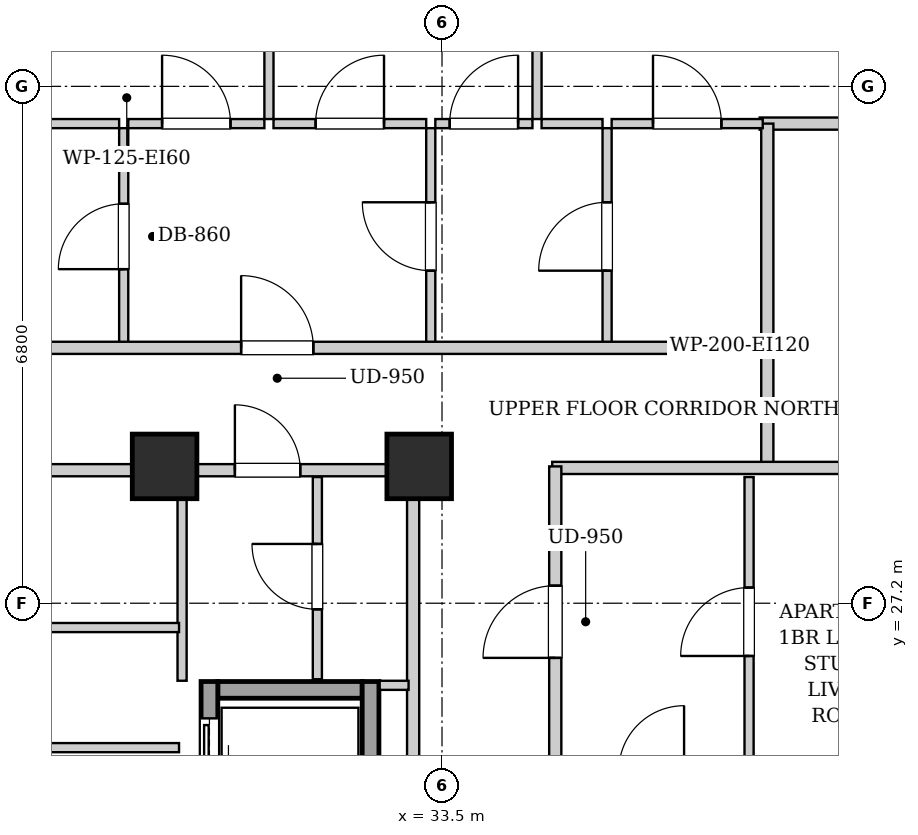
"""IFC4 building model, lengths in metres.
Left out: names, types, materials, properties, quantities, classifications, styles, units other than length and angle.
Written with IfcOpenShell. Run it as: python <this file> out.ifc"""

import sys

from ifc_helpers import new_model, si_unit, direction, frame, frame_2d, origin, origin_2d, place, context, subcontext, project, spatial, rectangle, extrude, element, fill, save


model = new_model("IFC4")
c1 = context("Model", 3, precision=1e-05, world=origin(), true_north=direction((0.0, 1.0)))
c2 = subcontext(c1, "Body", "Model", "MODEL_VIEW")
j1 = project(units=[si_unit("LENGTHUNIT", "METRE"), si_unit("PLANEANGLEUNIT", "RADIAN")], contexts=[c1])
p1 = place(None, origin())
s1 = spatial("IfcSite", under=j1, at=p1, CompositionType="ELEMENT")
p2 = place(p1, origin())
s2 = spatial("IfcBuilding", under=s1, at=p2, CompositionType="ELEMENT")
p3 = place(p2, frame((0.0, 0.0, 190.9)))
s3 = spatial("IfcBuildingStorey", under=s2, at=p3, CompositionType="ELEMENT", Elevation=190.9)
for number, where, z_axis, x_axis in (
    (1, (29.85, 29.0, 0.0), (0.0, 0.0, 1.0), (1.0, 0.0, 0.0)),
    (2, (33.2, 29.0, 0.0), (0.0, 0.0, 1.0), (1.0, 0.0, 0.0)),
):
    element("IfcColumn", number, at=place(p3, frame(where, z_axis=z_axis, x_axis=x_axis)), inside=s3, PredefinedType="COLUMN", context=c2, shape_type="SweptSolid", body=[
        extrude(rectangle(XDim=0.85, YDim=0.85, at=origin_2d()), origin(), (0.0, 0.0, 1.0), 3.3),
    ])
p4 = place(p3, frame((30.55, 26.06, 0.0), z_axis=(0.0, 0.0, 1.0), x_axis=(1.0, 0.0, 0.0)))
e3 = element("IfcWall", 3, at=p4, inside=s3, PredefinedType="SHEAR", context=c2, shape_type="SweptSolid", body=[
    extrude(rectangle(XDim=1.9, YDim=0.22, at=frame_2d((0.95, 0.0))), origin(), (0.0, 0.0, 1.0), 3.04),
])
p5 = place(p3, frame((30.44, 24.1, 0.0), z_axis=(0.0, 0.0, 1.0), x_axis=(0.0, 1.0, 0.0)))
e4 = element("IfcWall", 4, at=p5, inside=s3, PredefinedType="SHEAR", context=c2, shape_type="SweptSolid", body=[
    extrude(rectangle(XDim=2.07, YDim=0.22, at=frame_2d((1.035, 0.0))), origin(), (0.0, 0.0, 1.0), 3.04),
])
p6 = place(p5, frame((0.485, 0.0, 0.0)))
e5 = element("IfcOpeningElement", 5, at=p6, cuts=e4, PredefinedType="OPENING", context=c2, shape_type="SweptSolid", body=[
    extrude(rectangle(XDim=1.1, YDim=2.15, at=frame_2d((0.55, 1.075))), frame((0.0, 0.12, 0.0), z_axis=(0.0, -1.0, 0.0), x_axis=(1.0, 0.0, 0.0)), (0.0, 0.0, 1.0), 0.24),
])
p7 = place(p3, frame((32.56, 24.1, 0.0), z_axis=(0.0, 0.0, 1.0), x_axis=(0.0, 1.0, 0.0)))
e6 = element("IfcWall", 6, at=p7, inside=s3, PredefinedType="SHEAR", context=c2, shape_type="SweptSolid", body=[
    extrude(rectangle(XDim=2.07, YDim=0.22, at=frame_2d((1.035, 0.0))), origin(), (0.0, 0.0, 1.0), 3.04),
])
p8 = place(p3, frame((33.12, 24.12, 0.0), z_axis=(0.0, 0.0, 1.0), x_axis=(0.0, 1.0, 0.0)))
e7 = element("IfcWall", 7, at=p8, inside=s3, PredefinedType="PARTITIONING", context=c2, shape_type="SweptSolid", body=[
    extrude(rectangle(XDim=4.76, YDim=0.16, at=frame_2d((2.38, 0.0))), origin(), (0.0, 0.0, 1.0), 3.04),
])
p9 = place(p3, frame((30.08, 26.18, 0.0), z_axis=(0.0, 0.0, 1.0), x_axis=(0.0, 1.0, 0.0)))
e8 = element("IfcWall", 8, at=p9, inside=s3, PredefinedType="PARTITIONING", context=c2, shape_type="SweptSolid", body=[
    extrude(rectangle(XDim=2.68, YDim=0.12, at=frame_2d((1.34, 0.0))), origin(), (0.0, 0.0, 1.0), 3.04),
])
p10 = place(p3, frame((32.68, 26.12, 0.0), z_axis=(0.0, 0.0, 1.0), x_axis=(1.0, 0.0, 0.0)))
e9 = element("IfcWall", 9, at=p10, inside=s3, PredefinedType="PARTITIONING", context=c2, shape_type="SweptSolid", body=[
    extrude(rectangle(XDim=0.38, YDim=0.12, at=frame_2d((0.19, 0.0))), origin(), (0.0, 0.0, 1.0), 3.04),
])
p11 = place(p3, frame((31.86, 26.2, 0.0), z_axis=(0.0, 0.0, 1.0), x_axis=(0.0, 1.0, 0.0)))
e10 = element("IfcWall", 10, at=p11, inside=s3, PredefinedType="PARTITIONING", context=c2, shape_type="SweptSolid", body=[
    extrude(rectangle(XDim=2.66, YDim=0.12, at=frame_2d((1.33, 0.0))), origin(), (0.0, 0.0, 1.0), 3.04),
])
p12 = place(p11, frame((0.92, 0.0, 0.0)))
e11 = element("IfcOpeningElement", 11, at=p12, cuts=e10, PredefinedType="OPENING", context=c2, shape_type="SweptSolid", body=[
    extrude(rectangle(XDim=0.86, YDim=2.05, at=frame_2d((0.43, 1.025))), frame((0.0, 0.07, 0.0), z_axis=(0.0, -1.0, 0.0), x_axis=(1.0, 0.0, 0.0)), (0.0, 0.0, 1.0), 0.14),
])
p13 = place(p3, frame((30.08, 28.95, 0.0), z_axis=(0.0, 0.0, 1.0), x_axis=(1.0, 0.0, 0.0)))
e12 = element("IfcWall", 12, at=p13, inside=s3, PredefinedType="PARTITIONING", context=c2, shape_type="SweptSolid", body=[
    extrude(rectangle(XDim=2.96, YDim=0.16, at=frame_2d((1.48, 0.0))), origin(), (0.0, 0.0, 1.0), 3.04),
])
p14 = place(p13, frame((0.695, 0.0, 0.0)))
e13 = element("IfcOpeningElement", 13, at=p14, cuts=e12, PredefinedType="OPENING", context=c2, shape_type="SweptSolid", body=[
    extrude(rectangle(XDim=0.86, YDim=2.05, at=frame_2d((0.43, 1.025))), frame((0.0, 0.09, 0.0), z_axis=(0.0, -1.0, 0.0), x_axis=(1.0, 0.0, 0.0)), (0.0, 0.0, 1.0), 0.18),
])
p15 = place(p3, frame((25.72, 26.88, 0.0), z_axis=(0.0, 0.0, 1.0), x_axis=(1.0, 0.0, 0.0)))
e14 = element("IfcWall", 14, at=p15, inside=s3, PredefinedType="PARTITIONING", context=c2, shape_type="SweptSolid", body=[
    extrude(rectangle(XDim=4.32, YDim=0.12, at=frame_2d((2.16, 0.0))), origin(), (0.0, 0.0, 1.0), 3.04),
])
p16 = place(p3, frame((25.72, 25.3, 0.0), z_axis=(0.0, 0.0, 1.0), x_axis=(1.0, 0.0, 0.0)))
e15 = element("IfcWall", 15, at=p16, inside=s3, PredefinedType="PARTITIONING", context=c2, shape_type="SweptSolid", body=[
    extrude(rectangle(XDim=4.32, YDim=0.12, at=frame_2d((2.16, 0.0))), origin(), (0.0, 0.0, 1.0), 3.04),
])
p17 = place(p16, frame((1.65, 0.0, 0.0)))
e16 = element("IfcOpeningElement", 16, at=p17, cuts=e15, PredefinedType="OPENING", context=c2, shape_type="SweptSolid", body=[
    extrude(rectangle(XDim=0.9, YDim=2.05, at=frame_2d((0.45, 1.025))), frame((0.0, 0.07, 0.0), z_axis=(0.0, -1.0, 0.0), x_axis=(1.0, 0.0, 0.0)), (0.0, 0.0, 1.0), 0.14),
])
p18 = place(p3, frame((25.72, 28.95, 0.0), z_axis=(0.0, 0.0, 1.0), x_axis=(1.0, 0.0, 0.0)))
e17 = element("IfcWall", 17, at=p18, inside=s3, PredefinedType="PARTITIONING", context=c2, shape_type="SweptSolid", body=[
    extrude(rectangle(XDim=4.32, YDim=0.16, at=frame_2d((2.16, 0.0))), origin(), (0.0, 0.0, 1.0), 2.556),
])
p19 = place(p18, frame((1.27, 0.0, 0.0)))
e18 = element("IfcOpeningElement", 18, at=p19, cuts=e17, PredefinedType="OPENING", context=c2, shape_type="SweptSolid", body=[
    extrude(rectangle(XDim=0.86, YDim=2.05, at=frame_2d((0.43, 1.025))), frame((0.0, 0.09, 0.0), z_axis=(0.0, -1.0, 0.0), x_axis=(1.0, 0.0, 0.0)), (0.0, 0.0, 1.0), 0.18),
])
p20 = place(p3, frame((37.78, 28.98, 0.0), z_axis=(0.0, 0.0, 1.0), x_axis=(0.0, 1.0, 0.0)))
e19 = element("IfcWall", 19, at=p20, inside=s3, PredefinedType="PARTITIONING", context=c2, shape_type="SweptSolid", body=[
    extrude(rectangle(XDim=1.58, YDim=0.16, at=frame_2d((0.79, 0.0))), origin(), (0.0, 0.0, 1.0), 3.04),
])
p21 = place(p3, frame((34.95, 28.98, 0.0), z_axis=(0.0, 0.0, 1.0), x_axis=(1.0, 0.0, 0.0)))
e20 = element("IfcWall", 20, at=p21, inside=s3, PredefinedType="PARTITIONING", context=c2, shape_type="SweptSolid", body=[
    extrude(rectangle(XDim=5.07, YDim=0.16, at=frame_2d((2.535, 0.0))), origin(), (0.0, 0.0, 1.0), 2.556),
])
p22 = place(p3, frame((37.68, 33.51, 0.0), z_axis=(0.0, 0.0, 1.0), x_axis=(1.0, 0.0, 0.0)))
e21 = element("IfcWall", 21, at=p22, inside=s3, PredefinedType="PARTITIONING", context=c2, shape_type="SweptSolid", body=[
    extrude(rectangle(XDim=2.34, YDim=0.16, at=frame_2d((1.17, 0.0))), origin(), (0.0, 0.0, 1.0), 3.04),
])
p23 = place(p3, frame((37.78, 30.6, 0.0), z_axis=(0.0, 0.0, 1.0), x_axis=(0.0, 1.0, 0.0)))
e22 = element("IfcWall", 22, at=p23, inside=s3, PredefinedType="PARTITIONING", context=c2, shape_type="SweptSolid", body=[
    extrude(rectangle(XDim=2.91, YDim=0.16, at=frame_2d((1.455, 0.0))), origin(), (0.0, 0.0, 1.0), 3.04),
])
p24 = place(p3, frame((29.312, 30.6, 0.0), z_axis=(0.0, 0.0, 1.0), x_axis=(0.0, 1.0, 0.0)))
e23 = element("IfcWall", 23, at=p24, inside=s3, PredefinedType="PARTITIONING", context=c2, shape_type="SweptSolid", body=[
    extrude(rectangle(XDim=2.85, YDim=0.12, at=frame_2d((1.425, 0.0))), origin(), (0.0, 0.0, 1.0), 3.04),
])
p25 = place(p24, frame((0.995, 0.0, 0.0)))
e24 = element("IfcOpeningElement", 24, at=p25, cuts=e23, PredefinedType="OPENING", context=c2, shape_type="SweptSolid", body=[
    extrude(rectangle(XDim=0.86, YDim=2.05, at=frame_2d((0.43, 1.025))), frame((0.0, 0.07, 0.0), z_axis=(0.0, -1.0, 0.0), x_axis=(1.0, 0.0, 0.0)), (0.0, 0.0, 1.0), 0.14),
])
p26 = place(p3, frame((26.852, 33.51, 0.0), z_axis=(0.0, 0.0, 1.0), x_axis=(1.0, 0.0, 0.0)))
e25 = element("IfcWall", 25, at=p26, inside=s3, PredefinedType="PARTITIONING", context=c2, shape_type="SweptSolid", body=[
    extrude(rectangle(XDim=2.4, YDim=0.12, at=frame_2d((1.2, 0.0))), origin(), (0.0, 0.0, 1.0), 3.04),
])
p27 = place(p3, frame((33.352, 30.6, 0.0), z_axis=(0.0, 0.0, 1.0), x_axis=(0.0, 1.0, 0.0)))
e26 = element("IfcWall", 26, at=p27, inside=s3, PredefinedType="PARTITIONING", context=c2, shape_type="SweptSolid", body=[
    extrude(rectangle(XDim=2.85, YDim=0.12, at=frame_2d((1.425, 0.0))), origin(), (0.0, 0.0, 1.0), 3.04),
])
p28 = place(p27, frame((0.975, 0.0, 0.0)))
e27 = element("IfcOpeningElement", 27, at=p28, cuts=e26, PredefinedType="OPENING", context=c2, shape_type="SweptSolid", body=[
    extrude(rectangle(XDim=0.9, YDim=2.05, at=frame_2d((0.45, 1.025))), frame((0.0, 0.07, 0.0), z_axis=(0.0, -1.0, 0.0), x_axis=(1.0, 0.0, 0.0)), (0.0, 0.0, 1.0), 0.14),
])
p29 = place(p3, frame((29.372, 33.51, 0.0), z_axis=(0.0, 0.0, 1.0), x_axis=(1.0, 0.0, 0.0)))
e28 = element("IfcWall", 28, at=p29, inside=s3, PredefinedType="PARTITIONING", context=c2, shape_type="SweptSolid", body=[
    extrude(rectangle(XDim=1.791, YDim=0.12, at=frame_2d((0.896, 0.0))), origin(), (0.0, 0.0, 1.0), 3.04),
])
p30 = place(p29, frame((0.445, 0.0, 0.0)))
e29 = element("IfcOpeningElement", 29, at=p30, cuts=e28, PredefinedType="OPENING", context=c2, shape_type="SweptSolid", body=[
    extrude(rectangle(XDim=0.9, YDim=2.05, at=frame_2d((0.45, 1.025))), frame((0.0, 0.07, 0.0), z_axis=(0.0, -1.0, 0.0), x_axis=(1.0, 0.0, 0.0)), (0.0, 0.0, 1.0), 0.14),
])
p31 = place(p3, frame((31.283, 33.51, 0.0), z_axis=(0.0, 0.0, 1.0), x_axis=(1.0, 0.0, 0.0)))
e30 = element("IfcWall", 30, at=p31, inside=s3, PredefinedType="PARTITIONING", context=c2, shape_type="SweptSolid", body=[
    extrude(rectangle(XDim=2.009, YDim=0.12, at=frame_2d((1.004, 0.0))), origin(), (0.0, 0.0, 1.0), 3.04),
])
p32 = place(p31, frame((0.554, 0.0, 0.0)))
e31 = element("IfcOpeningElement", 31, at=p32, cuts=e30, PredefinedType="OPENING", context=c2, shape_type="SweptSolid", body=[
    extrude(rectangle(XDim=0.9, YDim=2.05, at=frame_2d((0.45, 1.025))), frame((0.0, 0.07, 0.0), z_axis=(0.0, -1.0, 0.0), x_axis=(1.0, 0.0, 0.0)), (0.0, 0.0, 1.0), 0.14),
])
p33 = place(p3, frame((35.672, 30.6, 0.0), z_axis=(0.0, 0.0, 1.0), x_axis=(0.0, 1.0, 0.0)))
e32 = element("IfcWall", 32, at=p33, inside=s3, PredefinedType="PARTITIONING", context=c2, shape_type="SweptSolid", body=[
    extrude(rectangle(XDim=2.85, YDim=0.12, at=frame_2d((1.425, 0.0))), origin(), (0.0, 0.0, 1.0), 3.04),
])
p34 = place(p33, frame((0.975, 0.0, 0.0)))
e33 = element("IfcOpeningElement", 33, at=p34, cuts=e32, PredefinedType="OPENING", context=c2, shape_type="SweptSolid", body=[
    extrude(rectangle(XDim=0.9, YDim=2.05, at=frame_2d((0.45, 1.025))), frame((0.0, 0.07, 0.0), z_axis=(0.0, -1.0, 0.0), x_axis=(1.0, 0.0, 0.0)), (0.0, 0.0, 1.0), 0.14),
])
p35 = place(p3, frame((33.412, 33.51, 0.0), z_axis=(0.0, 0.0, 1.0), x_axis=(1.0, 0.0, 0.0)))
e34 = element("IfcWall", 34, at=p35, inside=s3, PredefinedType="PARTITIONING", context=c2, shape_type="SweptSolid", body=[
    extrude(rectangle(XDim=1.278, YDim=0.12, at=frame_2d((0.639, 0.0))), origin(), (0.0, 0.0, 1.0), 3.04),
])
p36 = place(p35, frame((0.189, 0.0, 0.0)))
e35 = element("IfcOpeningElement", 35, at=p36, cuts=e34, PredefinedType="OPENING", context=c2, shape_type="SweptSolid", body=[
    extrude(rectangle(XDim=0.9, YDim=2.05, at=frame_2d((0.45, 1.025))), frame((0.0, 0.07, 0.0), z_axis=(0.0, -1.0, 0.0), x_axis=(1.0, 0.0, 0.0)), (0.0, 0.0, 1.0), 0.14),
])
p37 = place(p3, frame((34.81, 33.51, 0.0), z_axis=(0.0, 0.0, 1.0), x_axis=(1.0, 0.0, 0.0)))
e36 = element("IfcWall", 36, at=p37, inside=s3, PredefinedType="PARTITIONING", context=c2, shape_type="SweptSolid", body=[
    extrude(rectangle(XDim=0.802, YDim=0.12, at=frame_2d((0.401, 0.0))), origin(), (0.0, 0.0, 1.0), 3.04),
])
p38 = place(p3, frame((35.732, 33.51, 0.0), z_axis=(0.0, 0.0, 1.0), x_axis=(1.0, 0.0, 0.0)))
e37 = element("IfcWall", 37, at=p38, inside=s3, PredefinedType="PARTITIONING", context=c2, shape_type="SweptSolid", body=[
    extrude(rectangle(XDim=1.988, YDim=0.12, at=frame_2d((0.994, 0.0))), origin(), (0.0, 0.0, 1.0), 3.04),
])
p39 = place(p38, frame((0.544, 0.0, 0.0)))
e38 = element("IfcOpeningElement", 38, at=p39, cuts=e37, PredefinedType="OPENING", context=c2, shape_type="SweptSolid", body=[
    extrude(rectangle(XDim=0.9, YDim=2.05, at=frame_2d((0.45, 1.025))), frame((0.0, 0.07, 0.0), z_axis=(0.0, -1.0, 0.0), x_axis=(1.0, 0.0, 0.0)), (0.0, 0.0, 1.0), 0.14),
])
p40 = place(p3, frame((31.223, 33.57, 0.0), z_axis=(0.0, 0.0, 1.0), x_axis=(0.0, 1.0, 0.0)))
e39 = element("IfcWall", 39, at=p40, inside=s3, PredefinedType="PARTITIONING", context=c2, shape_type="SweptSolid", body=[
    extrude(rectangle(XDim=4.2, YDim=0.12, at=frame_2d((2.1, 0.0))), origin(), (0.0, 0.0, 1.0), 3.04),
])
p41 = place(p40, frame((1.65, 0.0, 0.0)))
e40 = element("IfcOpeningElement", 40, at=p41, cuts=e39, PredefinedType="OPENING", context=c2, shape_type="SweptSolid", body=[
    extrude(rectangle(XDim=0.9, YDim=2.05, at=frame_2d((0.45, 1.025))), frame((0.0, 0.07, 0.0), z_axis=(0.0, -1.0, 0.0), x_axis=(1.0, 0.0, 0.0)), (0.0, 0.0, 1.0), 0.14),
])
p42 = place(p3, frame((34.75, 33.57, 0.0), z_axis=(0.0, 0.0, 1.0), x_axis=(0.0, 1.0, 0.0)))
e41 = element("IfcWall", 41, at=p42, inside=s3, PredefinedType="PARTITIONING", context=c2, shape_type="SweptSolid", body=[
    extrude(rectangle(XDim=4.2, YDim=0.12, at=frame_2d((2.1, 0.0))), origin(), (0.0, 0.0, 1.0), 3.04),
])
p43 = place(p42, frame((1.65, 0.0, 0.0)))
e42 = element("IfcOpeningElement", 42, at=p43, cuts=e41, PredefinedType="OPENING", context=c2, shape_type="SweptSolid", body=[
    extrude(rectangle(XDim=0.9, YDim=2.05, at=frame_2d((0.45, 1.025))), frame((0.0, 0.07, 0.0), z_axis=(0.0, -1.0, 0.0), x_axis=(1.0, 0.0, 0.0)), (0.0, 0.0, 1.0), 0.14),
])
p44 = place(p3, frame((37.54, 25.052, 0.0), z_axis=(0.0, 0.0, 1.0), x_axis=(0.0, 1.0, 0.0)))
e43 = element("IfcWall", 43, at=p44, inside=s3, PredefinedType="PARTITIONING", context=c2, shape_type="SweptSolid", body=[
    extrude(rectangle(XDim=3.808, YDim=0.12, at=frame_2d((1.904, 0.0))), origin(), (0.0, 0.0, 1.0), 3.04),
])
p45 = place(p44, frame((1.454, 0.0, 0.0)))
e44 = element("IfcOpeningElement", 44, at=p45, cuts=e43, PredefinedType="OPENING", context=c2, shape_type="SweptSolid", body=[
    extrude(rectangle(XDim=0.9, YDim=2.05, at=frame_2d((0.45, 1.025))), frame((0.0, 0.07, 0.0), z_axis=(0.0, -1.0, 0.0), x_axis=(1.0, 0.0, 0.0)), (0.0, 0.0, 1.0), 0.14),
])
p46 = place(p3, frame((13.15, 30.56, 0.0), z_axis=(0.0, 0.0, 1.0), x_axis=(1.0, 0.0, 0.0)))
e45 = element("IfcWall", 45, at=p46, inside=s3, PredefinedType="PARTITIONING", context=c2, shape_type="SweptSolid", body=[
    extrude(rectangle(XDim=24.6, YDim=0.16, at=frame_2d((12.3, 0.0))), origin(), (0.0, 0.0, 1.0), 3.04),
])
p47 = place(p46, frame((3.115, 0.0, 0.0)))
e46 = element("IfcOpeningElement", 46, at=p47, cuts=e45, PredefinedType="OPENING", context=c2, shape_type="SweptSolid", body=[
    extrude(rectangle(XDim=0.95, YDim=2.1, at=frame_2d((0.475, 1.05))), frame((0.0, 0.09, 0.0), z_axis=(0.0, -1.0, 0.0), x_axis=(1.0, 0.0, 0.0)), (0.0, 0.0, 1.0), 0.18),
])
p48 = place(p46, frame((11.489, 0.0, 0.0)))
e47 = element("IfcOpeningElement", 47, at=p48, cuts=e45, PredefinedType="OPENING", context=c2, shape_type="SweptSolid", body=[
    extrude(rectangle(XDim=0.95, YDim=2.1, at=frame_2d((0.475, 1.05))), frame((0.0, 0.09, 0.0), z_axis=(0.0, -1.0, 0.0), x_axis=(1.0, 0.0, 0.0)), (0.0, 0.0, 1.0), 0.18),
])
p49 = place(p46, frame((17.707, 0.0, 0.0)))
e48 = element("IfcOpeningElement", 48, at=p49, cuts=e45, PredefinedType="OPENING", context=c2, shape_type="SweptSolid", body=[
    extrude(rectangle(XDim=0.95, YDim=2.1, at=frame_2d((0.475, 1.05))), frame((0.0, 0.09, 0.0), z_axis=(0.0, -1.0, 0.0), x_axis=(1.0, 0.0, 0.0)), (0.0, 0.0, 1.0), 0.18),
])
p50 = place(p3, frame((34.99, 15.07, 0.0), z_axis=(0.0, 0.0, 1.0), x_axis=(0.0, 1.0, 0.0)))
e49 = element("IfcWall", 49, at=p50, inside=s3, PredefinedType="PARTITIONING", context=c2, shape_type="SweptSolid", body=[
    extrude(rectangle(XDim=13.93, YDim=0.16, at=frame_2d((6.965, 0.0))), origin(), (0.0, 0.0, 1.0), 3.04),
])
p51 = place(p50, frame((4.661, 0.0, 0.0)))
e50 = element("IfcOpeningElement", 50, at=p51, cuts=e49, PredefinedType="OPENING", context=c2, shape_type="SweptSolid", body=[
    extrude(rectangle(XDim=0.95, YDim=2.1, at=frame_2d((0.475, 1.05))), frame((0.0, 0.09, 0.0), z_axis=(0.0, -1.0, 0.0), x_axis=(1.0, 0.0, 0.0)), (0.0, 0.0, 1.0), 0.18),
])
p52 = place(p50, frame((11.411, 0.0, 0.0)))
e51 = element("IfcOpeningElement", 51, at=p52, cuts=e49, PredefinedType="OPENING", context=c2, shape_type="SweptSolid", body=[
    extrude(rectangle(XDim=0.95, YDim=2.1, at=frame_2d((0.475, 1.05))), frame((0.0, 0.09, 0.0), z_axis=(0.0, -1.0, 0.0), x_axis=(1.0, 0.0, 0.0)), (0.0, 0.0, 1.0), 0.18),
])
p53 = place(p6, origin())
e52 = element("IfcDoor", 52, at=p53, inside=s3, OperationType="SLIDING_TO_LEFT", PredefinedType="DOOR", context=c2, shape_type="SweptSolid", body=[
    extrude(rectangle(XDim=1.1, YDim=2.15, at=frame_2d((0.55, 1.075))), frame((0.0, 0.025, 0.0), z_axis=(0.0, -1.0, 0.0), x_axis=(1.0, 0.0, 0.0)), (0.0, 0.0, 1.0), 0.05),
])
fill(e5, e52)
p54 = place(p12, origin())
e53 = element("IfcDoor", 53, at=p54, inside=s3, OperationType="SINGLE_SWING_RIGHT", PredefinedType="DOOR", context=c2, shape_type="SweptSolid", body=[
    extrude(rectangle(XDim=0.86, YDim=2.05, at=frame_2d((0.43, 1.025))), frame((0.0, 0.025, 0.0), z_axis=(0.0, -1.0, 0.0), x_axis=(1.0, 0.0, 0.0)), (0.0, 0.0, 1.0), 0.05),
])
fill(e11, e53)
p55 = place(p14, origin())
e54 = element("IfcDoor", 54, at=p55, inside=s3, OperationType="SINGLE_SWING_LEFT", PredefinedType="DOOR", context=c2, shape_type="SweptSolid", body=[
    extrude(rectangle(XDim=0.86, YDim=2.05, at=frame_2d((0.43, 1.025))), frame((0.0, 0.025, 0.0), z_axis=(0.0, -1.0, 0.0), x_axis=(1.0, 0.0, 0.0)), (0.0, 0.0, 1.0), 0.05),
])
fill(e13, e54)
p56 = place(p25, origin())
e55 = element("IfcDoor", 55, at=p56, inside=s3, OperationType="SINGLE_SWING_LEFT", PredefinedType="DOOR", context=c2, shape_type="SweptSolid", body=[
    extrude(rectangle(XDim=0.86, YDim=2.05, at=frame_2d((0.43, 1.025))), frame((0.0, 0.025, 0.0), z_axis=(0.0, -1.0, 0.0), x_axis=(1.0, 0.0, 0.0)), (0.0, 0.0, 1.0), 0.05),
])
fill(e24, e55)
p57 = place(p28, origin())
e56 = element("IfcDoor", 56, at=p57, inside=s3, OperationType="SINGLE_SWING_RIGHT", PredefinedType="DOOR", context=c2, shape_type="SweptSolid", body=[
    extrude(rectangle(XDim=0.9, YDim=2.05, at=frame_2d((0.45, 1.025))), frame((0.0, 0.025, 0.0), z_axis=(0.0, -1.0, 0.0), x_axis=(1.0, 0.0, 0.0)), (0.0, 0.0, 1.0), 0.05),
])
fill(e27, e56)
p58 = place(p30, origin())
e57 = element("IfcDoor", 57, at=p58, inside=s3, OperationType="SINGLE_SWING_LEFT", PredefinedType="DOOR", context=c2, shape_type="SweptSolid", body=[
    extrude(rectangle(XDim=0.9, YDim=2.05, at=frame_2d((0.45, 1.025))), frame((0.0, 0.025, 0.0), z_axis=(0.0, -1.0, 0.0), x_axis=(1.0, 0.0, 0.0)), (0.0, 0.0, 1.0), 0.05),
])
fill(e29, e57)
p59 = place(p32, origin())
e58 = element("IfcDoor", 58, at=p59, inside=s3, OperationType="SINGLE_SWING_RIGHT", PredefinedType="DOOR", context=c2, shape_type="SweptSolid", body=[
    extrude(rectangle(XDim=0.9, YDim=2.05, at=frame_2d((0.45, 1.025))), frame((0.0, 0.025, 0.0), z_axis=(0.0, -1.0, 0.0), x_axis=(1.0, 0.0, 0.0)), (0.0, 0.0, 1.0), 0.05),
])
fill(e31, e58)
p60 = place(p34, origin())
e59 = element("IfcDoor", 59, at=p60, inside=s3, OperationType="SINGLE_SWING_LEFT", PredefinedType="DOOR", context=c2, shape_type="SweptSolid", body=[
    extrude(rectangle(XDim=0.9, YDim=2.05, at=frame_2d((0.45, 1.025))), frame((0.0, 0.025, 0.0), z_axis=(0.0, -1.0, 0.0), x_axis=(1.0, 0.0, 0.0)), (0.0, 0.0, 1.0), 0.05),
])
fill(e33, e59)
p61 = place(p36, origin())
e60 = element("IfcDoor", 60, at=p61, inside=s3, OperationType="SINGLE_SWING_RIGHT", PredefinedType="DOOR", context=c2, shape_type="SweptSolid", body=[
    extrude(rectangle(XDim=0.9, YDim=2.05, at=frame_2d((0.45, 1.025))), frame((0.0, 0.025, 0.0), z_axis=(0.0, -1.0, 0.0), x_axis=(1.0, 0.0, 0.0)), (0.0, 0.0, 1.0), 0.05),
])
fill(e35, e60)
p62 = place(p39, origin())
e61 = element("IfcDoor", 61, at=p62, inside=s3, OperationType="SINGLE_SWING_LEFT", PredefinedType="DOOR", context=c2, shape_type="SweptSolid", body=[
    extrude(rectangle(XDim=0.9, YDim=2.05, at=frame_2d((0.45, 1.025))), frame((0.0, 0.025, 0.0), z_axis=(0.0, -1.0, 0.0), x_axis=(1.0, 0.0, 0.0)), (0.0, 0.0, 1.0), 0.05),
])
fill(e38, e61)
p63 = place(p45, origin())
e62 = element("IfcDoor", 62, at=p63, inside=s3, OperationType="SINGLE_SWING_LEFT", PredefinedType="DOOR", context=c2, shape_type="SweptSolid", body=[
    extrude(rectangle(XDim=0.9, YDim=2.05, at=frame_2d((0.45, 1.025))), frame((0.0, 0.025, 0.0), z_axis=(0.0, -1.0, 0.0), x_axis=(1.0, 0.0, 0.0)), (0.0, 0.0, 1.0), 0.05),
])
fill(e44, e62)
p64 = place(p49, origin())
e63 = element("IfcDoor", 63, at=p64, inside=s3, OperationType="SINGLE_SWING_LEFT", PredefinedType="DOOR", context=c2, shape_type="SweptSolid", body=[
    extrude(rectangle(XDim=0.95, YDim=2.1, at=frame_2d((0.475, 1.05))), frame((0.0, 0.025, 0.0), z_axis=(0.0, -1.0, 0.0), x_axis=(1.0, 0.0, 0.0)), (0.0, 0.0, 1.0), 0.05),
])
fill(e48, e63)
p65 = place(p52, origin())
e64 = element("IfcDoor", 64, at=p65, inside=s3, OperationType="SINGLE_SWING_LEFT", PredefinedType="DOOR", context=c2, shape_type="SweptSolid", body=[
    extrude(rectangle(XDim=0.95, YDim=2.1, at=frame_2d((0.475, 1.05))), frame((0.0, 0.025, 0.0), z_axis=(0.0, -1.0, 0.0), x_axis=(1.0, 0.0, 0.0)), (0.0, 0.0, 1.0), 0.05),
])
fill(e51, e64)
save(model, sys.argv[1])
